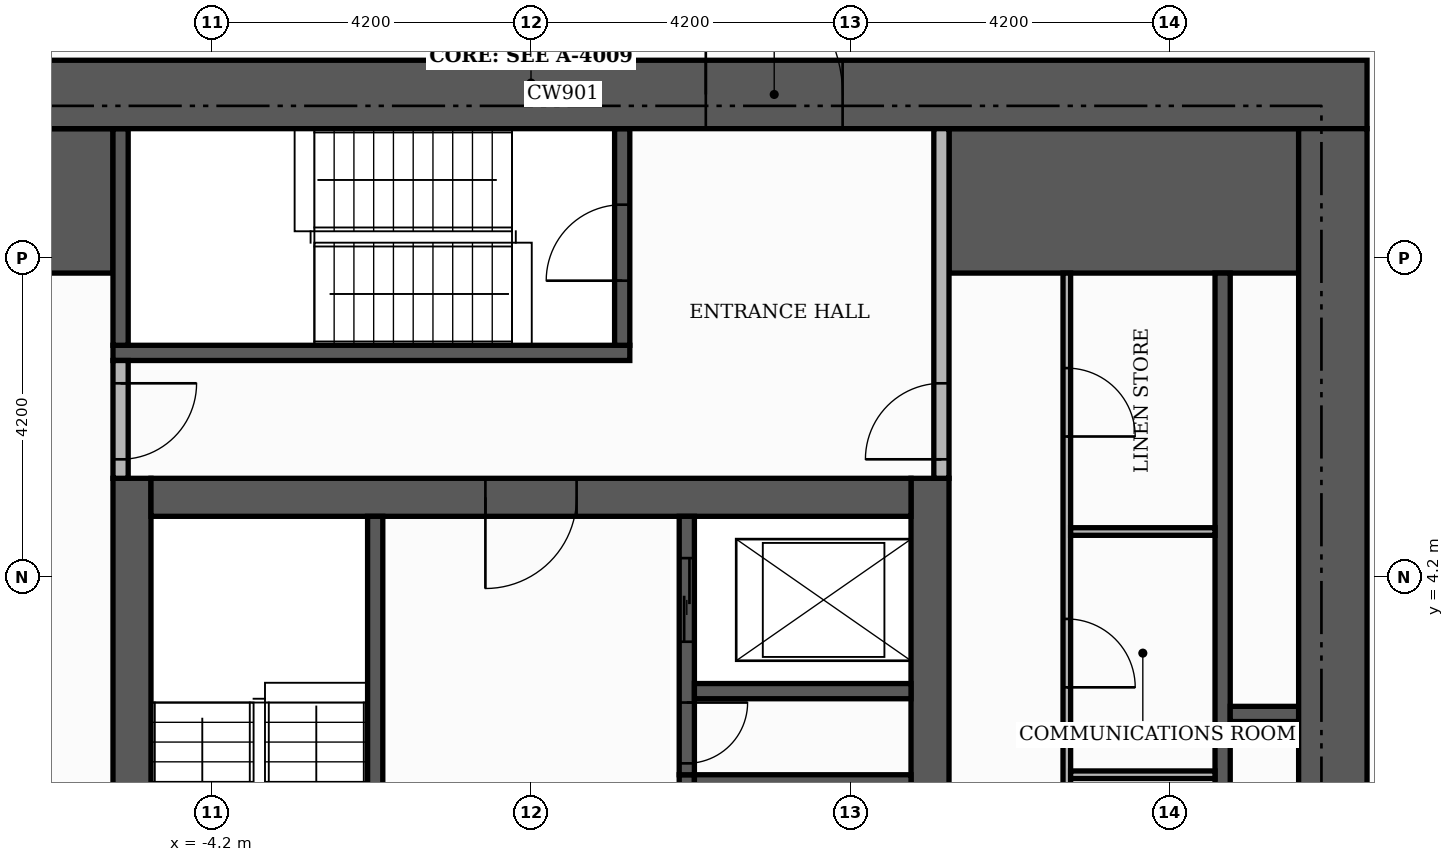
"""IFC4 building model, lengths in metres.
Left out: names, types, materials, properties, quantities, classifications, styles, units other than length and angle.
Written with IfcOpenShell. Run it as: python <this file> out.ifc"""

import sys

from ifc_helpers import new_model, si_unit, direction, frame, frame_2d, origin, place, context, subcontext, project, spatial, rectangle, extrude, element, fill, save


model = new_model("IFC4")
c1 = context("Model", 3, precision=1e-05, world=origin(), true_north=direction((0.0, 1.0)))
c2 = subcontext(c1, "Body", "Model", "MODEL_VIEW")
j1 = project(units=[si_unit("LENGTHUNIT", "METRE"), si_unit("PLANEANGLEUNIT", "RADIAN")], contexts=[c1])
p1 = place(None, origin())
s1 = spatial("IfcSite", under=j1, at=p1, CompositionType="ELEMENT")
p2 = place(p1, origin())
s2 = spatial("IfcBuilding", under=s1, at=p2, CompositionType="ELEMENT")
p3 = place(p2, frame((0.0, 0.0, 42.6)))
s3 = spatial("IfcBuildingStorey", under=s2, at=p3, CompositionType="ELEMENT", Elevation=42.6)
for number, where, z_axis, x_axis in (
    (1, (-5.25, -5.0, 0.0), (0.0, 0.0, 1.0), (0.0, 1.0, 0.0)),
    (2, (5.25, -5.0, 0.0), (0.0, 0.0, 1.0), (0.0, 1.0, 0.0)),
):
    element("IfcWall", number, at=place(p3, frame(where, z_axis=z_axis, x_axis=x_axis)), inside=s3, PredefinedType="SHEAR", context=c2, shape_type="SweptSolid", body=[
        extrude(rectangle(XDim=10.5, YDim=0.5, at=frame_2d((5.25, 0.0))), origin(), (0.0, 0.0, 1.0), 3.48),
    ])
p4 = place(p3, frame((-5.0, 5.25, 0.0), z_axis=(0.0, 0.0, 1.0), x_axis=(1.0, 0.0, 0.0)))
e3 = element("IfcWall", 3, at=p4, inside=s3, PredefinedType="SHEAR", context=c2, shape_type="SweptSolid", body=[
    extrude(rectangle(XDim=10.0, YDim=0.5, at=frame_2d((5.0, 0.0))), origin(), (0.0, 0.0, 1.0), 3.48),
])
p5 = place(p4, frame((4.4, 0.0, 0.0)))
e4 = element("IfcOpeningElement", 4, at=p5, cuts=e3, PredefinedType="OPENING", context=c2, shape_type="SweptSolid", body=[
    extrude(rectangle(XDim=1.2, YDim=2.1, at=frame_2d((0.6, 1.05))), frame((0.0, 0.26, 0.0), z_axis=(0.0, -1.0, 0.0), x_axis=(1.0, 0.0, 0.0)), (0.0, 0.0, 1.0), 0.52),
])
for number, where, z_axis, x_axis in (
    (5, (-10.1, 9.15, 0.0), (0.0, 0.0, 1.0), (1.0, 0.0, 0.0)),
    (6, (5.5, 9.15, 0.0), (0.0, 0.0, 1.0), (1.0, 0.0, 0.0)),
):
    element("IfcWall", number, at=place(p3, frame(where, z_axis=z_axis, x_axis=x_axis)), inside=s3, PredefinedType="SHEAR", context=c2, shape_type="SweptSolid", body=[
        extrude(rectangle(XDim=4.6, YDim=1.9, at=frame_2d((2.3, 0.0))), origin(), (0.0, 0.0, 1.0), 3.48),
    ])
p6 = place(p3, frame((2.05, -5.0, 0.0), z_axis=(0.0, 0.0, 1.0), x_axis=(0.0, 1.0, 0.0)))
e7 = element("IfcWall", 7, at=p6, inside=s3, PredefinedType="SHEAR", context=c2, shape_type="SweptSolid", body=[
    extrude(rectangle(XDim=6.6, YDim=0.2, at=frame_2d((3.3, 0.0))), origin(), (0.0, 0.0, 1.0), 3.48),
])
p7 = place(p6, frame((5.25, 0.0, 0.0)))
e8 = element("IfcOpeningElement", 8, at=p7, cuts=e7, PredefinedType="OPENING", context=c2, shape_type="SweptSolid", body=[
    extrude(rectangle(XDim=1.0, YDim=2.1, at=frame_2d((0.5, 1.05))), frame((0.0, 0.11, 0.0), z_axis=(0.0, -1.0, 0.0), x_axis=(1.0, 0.0, 0.0)), (0.0, 0.0, 1.0), 0.22),
])
p8 = place(p3, frame((-2.05, -1.4, 0.0), z_axis=(0.0, 0.0, 1.0), x_axis=(0.0, 1.0, 0.0)))
e9 = element("IfcWall", 9, at=p8, inside=s3, PredefinedType="SHEAR", context=c2, shape_type="SweptSolid", body=[
    extrude(rectangle(XDim=6.4, YDim=0.2, at=frame_2d((3.2, 0.0))), origin(), (0.0, 0.0, 1.0), 3.48),
])
p9 = place(p8, frame((0.15, 0.0, 0.0)))
e10 = element("IfcOpeningElement", 10, at=p9, cuts=e9, PredefinedType="OPENING", context=c2, shape_type="SweptSolid", body=[
    extrude(rectangle(XDim=1.0, YDim=2.1, at=frame_2d((0.5, 1.05))), frame((0.0, 0.11, 0.0), z_axis=(0.0, -1.0, 0.0), x_axis=(1.0, 0.0, 0.0)), (0.0, 0.0, 1.0), 0.22),
])
p10 = place(p3, frame((2.15, 1.5, 0.0), z_axis=(0.0, 0.0, 1.0), x_axis=(1.0, 0.0, 0.0)))
e11 = element("IfcWall", 11, at=p10, inside=s3, PredefinedType="SHEAR", context=c2, shape_type="SweptSolid", body=[
    extrude(rectangle(XDim=2.85, YDim=0.2, at=frame_2d((1.425, 0.0))), origin(), (0.0, 0.0, 1.0), 3.48),
])
p11 = place(p3, frame((-5.5, 7.15, 0.0), z_axis=(0.0, 0.0, 1.0), x_axis=(1.0, 0.0, 0.0)))
e12 = element("IfcWall", 12, at=p11, inside=s3, PredefinedType="SHEAR", context=c2, shape_type="SweptSolid", body=[
    extrude(rectangle(XDim=6.8, YDim=0.2, at=frame_2d((3.4, 0.0))), origin(), (0.0, 0.0, 1.0), 3.48),
])
p12 = place(p3, frame((-5.4, 7.25, 0.0), z_axis=(0.0, 0.0, 1.0), x_axis=(0.0, 1.0, 0.0)))
e13 = element("IfcWall", 13, at=p12, inside=s3, PredefinedType="SHEAR", context=c2, shape_type="SweptSolid", body=[
    extrude(rectangle(XDim=2.85, YDim=0.2, at=frame_2d((1.425, 0.0))), origin(), (0.0, 0.0, 1.0), 3.48),
])
p13 = place(p3, frame((1.2, 7.25, 0.0), z_axis=(0.0, 0.0, 1.0), x_axis=(0.0, 1.0, 0.0)))
e14 = element("IfcWall", 14, at=p13, inside=s3, PredefinedType="SHEAR", context=c2, shape_type="SweptSolid", body=[
    extrude(rectangle(XDim=2.85, YDim=0.2, at=frame_2d((1.425, 0.0))), origin(), (0.0, 0.0, 1.0), 3.48),
])
p14 = place(p13, frame((0.85, 0.0, 0.0)))
e15 = element("IfcOpeningElement", 15, at=p14, cuts=e14, PredefinedType="OPENING", context=c2, shape_type="SweptSolid", body=[
    extrude(rectangle(XDim=1.0, YDim=2.1, at=frame_2d((0.5, 1.05))), frame((0.0, 0.11, 0.0), z_axis=(0.0, -1.0, 0.0), x_axis=(1.0, 0.0, 0.0)), (0.0, 0.0, 1.0), 0.22),
])
p15 = place(p3, frame((9.1, -8.2, 0.0), z_axis=(0.0, 0.0, 1.0), x_axis=(0.0, 1.0, 0.0)))
e16 = element("IfcWall", 16, at=p15, inside=s3, PredefinedType="SHEAR", context=c2, shape_type="SweptSolid", body=[
    extrude(rectangle(XDim=16.4, YDim=0.2, at=frame_2d((8.2, 0.0))), origin(), (0.0, 0.0, 1.0), 3.48),
])
p16 = place(p3, frame((2.05, 1.6, 0.0), z_axis=(0.0, 0.0, 1.0), x_axis=(0.0, 1.0, 0.0)))
e17 = element("IfcWall", 17, at=p16, inside=s3, PredefinedType="SHEAR", context=c2, shape_type="SweptSolid", body=[
    extrude(rectangle(XDim=3.4, YDim=0.2, at=frame_2d((1.7, 0.0))), origin(), (0.0, 0.0, 1.0), 3.48),
])
p17 = place(p16, frame((1.75, 0.0, 0.0)))
e18 = element("IfcOpeningElement", 18, at=p17, cuts=e17, PredefinedType="OPENING", context=c2, shape_type="SweptSolid", body=[
    extrude(rectangle(XDim=1.1, YDim=2.1, at=frame_2d((0.55, 1.05))), frame((0.0, 0.11, 0.0), z_axis=(0.0, -1.0, 0.0), x_axis=(1.0, 0.0, 0.0)), (0.0, 0.0, 1.0), 0.22),
])
p18 = place(p16, frame((0.15, 0.0, 0.0)))
e19 = element("IfcOpeningElement", 19, at=p18, cuts=e17, PredefinedType="OPENING", context=c2, shape_type="SweptSolid", body=[
    extrude(rectangle(XDim=0.8, YDim=2.1, at=frame_2d((0.4, 1.05))), frame((0.0, 0.11, 0.0), z_axis=(0.0, -1.0, 0.0), x_axis=(1.0, 0.0, 0.0)), (0.0, 0.0, 1.0), 0.22),
])
p19 = place(p3, frame((9.2, 2.4, 0.0), z_axis=(0.0, 0.0, 1.0), x_axis=(1.0, 0.0, 0.0)))
e20 = element("IfcWall", 20, at=p19, inside=s3, PredefinedType="SHEAR", context=c2, shape_type="SweptSolid", body=[
    extrude(rectangle(XDim=0.9, YDim=0.2, at=frame_2d((0.45, 0.0))), origin(), (0.0, 0.0, 1.0), 3.48),
])
p20 = place(p3, frame((2.15, 2.7, 0.0), z_axis=(0.0, 0.0, 1.0), x_axis=(1.0, 0.0, 0.0)))
e21 = element("IfcWall", 21, at=p20, inside=s3, PredefinedType="SHEAR", context=c2, shape_type="SweptSolid", body=[
    extrude(rectangle(XDim=2.85, YDim=0.2, at=frame_2d((1.425, 0.0))), origin(), (0.0, 0.0, 1.0), 3.48),
])
p21 = place(p3, frame((-11.0, 10.55, 0.0), z_axis=(0.0, 0.0, 1.0), x_axis=(1.0, 0.0, 0.0)))
e22 = element("IfcWall", 22, at=p21, inside=s3, PredefinedType="SHEAR", context=c2, shape_type="SweptSolid", body=[
    extrude(rectangle(XDim=22.0, YDim=0.9, at=frame_2d((11.0, 0.0))), origin(), (0.0, 0.0, 1.0), 3.48),
])
p22 = place(p21, frame((13.3, 0.0, 0.0)))
e23 = element("IfcOpeningElement", 23, at=p22, cuts=e22, PredefinedType="OPENING", context=c2, shape_type="SweptSolid", body=[
    extrude(rectangle(XDim=1.8, YDim=2.2, at=frame_2d((0.9, 1.1))), frame((0.0, 0.46, 0.0), z_axis=(0.0, -1.0, 0.0), x_axis=(1.0, 0.0, 0.0)), (0.0, 0.0, 1.0), 0.92),
])
p23 = place(p3, frame((10.55, -10.1, 0.0), z_axis=(0.0, 0.0, 1.0), x_axis=(0.0, 1.0, 0.0)))
e24 = element("IfcWall", 24, at=p23, inside=s3, PredefinedType="SHEAR", context=c2, shape_type="SweptSolid", body=[
    extrude(rectangle(XDim=20.2, YDim=0.9, at=frame_2d((10.1, 0.0))), origin(), (0.0, 0.0, 1.0), 3.48),
])
p24 = place(p3, frame((7.05, -8.2, 0.0), z_axis=(0.0, 0.0, 1.0), x_axis=(0.0, 1.0, 0.0)))
e25 = element("IfcWall", 25, at=p24, inside=s3, PredefinedType="PARTITIONING", context=c2, shape_type="SweptSolid", body=[
    extrude(rectangle(XDim=16.4, YDim=0.1, at=frame_2d((8.2, 0.0))), origin(), (0.0, 0.0, 1.0), 3.48),
])
p25 = place(p24, frame((1.15, 0.0, 0.0)))
e26 = element("IfcOpeningElement", 26, at=p25, cuts=e25, PredefinedType="OPENING", context=c2, shape_type="SweptSolid", body=[
    extrude(rectangle(XDim=0.9, YDim=2.1, at=frame_2d((0.45, 1.05))), frame((0.0, 0.06, 0.0), z_axis=(0.0, -1.0, 0.0), x_axis=(1.0, 0.0, 0.0)), (0.0, 0.0, 1.0), 0.12),
])
p26 = place(p24, frame((4.3, 0.0, 0.0)))
e27 = element("IfcOpeningElement", 27, at=p26, cuts=e25, PredefinedType="OPENING", context=c2, shape_type="SweptSolid", body=[
    extrude(rectangle(XDim=1.0, YDim=2.1, at=frame_2d((0.5, 1.05))), frame((0.0, 0.06, 0.0), z_axis=(0.0, -1.0, 0.0), x_axis=(1.0, 0.0, 0.0)), (0.0, 0.0, 1.0), 0.12),
])
p27 = place(p24, frame((7.65, 0.0, 0.0)))
e28 = element("IfcOpeningElement", 28, at=p27, cuts=e25, PredefinedType="OPENING", context=c2, shape_type="SweptSolid", body=[
    extrude(rectangle(XDim=0.9, YDim=2.1, at=frame_2d((0.45, 1.05))), frame((0.0, 0.06, 0.0), z_axis=(0.0, -1.0, 0.0), x_axis=(1.0, 0.0, 0.0)), (0.0, 0.0, 1.0), 0.12),
])
p28 = place(p24, frame((10.95, 0.0, 0.0)))
e29 = element("IfcOpeningElement", 29, at=p28, cuts=e25, PredefinedType="OPENING", context=c2, shape_type="SweptSolid", body=[
    extrude(rectangle(XDim=0.9, YDim=2.1, at=frame_2d((0.45, 1.05))), frame((0.0, 0.06, 0.0), z_axis=(0.0, -1.0, 0.0), x_axis=(1.0, 0.0, 0.0)), (0.0, 0.0, 1.0), 0.12),
])
p29 = place(p24, frame((14.25, 0.0, 0.0)))
e30 = element("IfcOpeningElement", 30, at=p29, cuts=e25, PredefinedType="OPENING", context=c2, shape_type="SweptSolid", body=[
    extrude(rectangle(XDim=0.9, YDim=2.1, at=frame_2d((0.45, 1.05))), frame((0.0, 0.06, 0.0), z_axis=(0.0, -1.0, 0.0), x_axis=(1.0, 0.0, 0.0)), (0.0, 0.0, 1.0), 0.12),
])
for number, where, z_axis, x_axis in (
    (31, (7.1, 1.6, 0.0), (0.0, 0.0, 1.0), (1.0, 0.0, 0.0)),
    (32, (7.1, 4.8, 0.0), (0.0, 0.0, 1.0), (1.0, 0.0, 0.0)),
):
    element("IfcWall", number, at=place(p3, frame(where, z_axis=z_axis, x_axis=x_axis)), inside=s3, PredefinedType="PARTITIONING", context=c2, shape_type="SweptSolid", body=[
        extrude(rectangle(XDim=1.9, YDim=0.1, at=frame_2d((0.95, 0.0))), origin(), (0.0, 0.0, 1.0), 3.48),
    ])
p30 = place(p3, frame((-5.4, 5.5, 0.0), z_axis=(0.0, 0.0, 1.0), x_axis=(0.0, 1.0, 0.0)))
e33 = element("IfcWall", 33, at=p30, inside=s3, PredefinedType="PARTITIONING", context=c2, shape_type="SweptSolid", body=[
    extrude(rectangle(XDim=1.55, YDim=0.2, at=frame_2d((0.775, 0.0))), origin(), (0.0, 0.0, 1.0), 3.48),
])
p31 = place(p30, frame((0.25, 0.0, 0.0)))
e34 = element("IfcOpeningElement", 34, at=p31, cuts=e33, PredefinedType="OPENING", context=c2, shape_type="SweptSolid", body=[
    extrude(rectangle(XDim=1.0, YDim=2.1, at=frame_2d((0.5, 1.05))), frame((0.0, 0.11, 0.0), z_axis=(0.0, -1.0, 0.0), x_axis=(1.0, 0.0, 0.0)), (0.0, 0.0, 1.0), 0.22),
])
p32 = place(p3, frame((5.4, 5.5, 0.0), z_axis=(0.0, 0.0, 1.0), x_axis=(0.0, 1.0, 0.0)))
e35 = element("IfcWall", 35, at=p32, inside=s3, PredefinedType="PARTITIONING", context=c2, shape_type="SweptSolid", body=[
    extrude(rectangle(XDim=4.6, YDim=0.2, at=frame_2d((2.3, 0.0))), origin(), (0.0, 0.0, 1.0), 3.48),
])
p33 = place(p32, frame((0.25, 0.0, 0.0)))
e36 = element("IfcOpeningElement", 36, at=p33, cuts=e35, PredefinedType="OPENING", context=c2, shape_type="SweptSolid", body=[
    extrude(rectangle(XDim=1.0, YDim=2.1, at=frame_2d((0.5, 1.05))), frame((0.0, 0.11, 0.0), z_axis=(0.0, -1.0, 0.0), x_axis=(1.0, 0.0, 0.0)), (0.0, 0.0, 1.0), 0.22),
])
p34 = place(p17, origin())
e37 = element("IfcDoor", 37, at=p34, inside=s3, OperationType="SLIDING_TO_LEFT", PredefinedType="DOOR", context=c2, shape_type="SweptSolid", body=[
    extrude(rectangle(XDim=1.1, YDim=2.1, at=frame_2d((0.55, 1.05))), frame((0.0, 0.025, 0.0), z_axis=(0.0, -1.0, 0.0), x_axis=(1.0, 0.0, 0.0)), (0.0, 0.0, 1.0), 0.05),
])
fill(e18, e37)
p35 = place(p18, frame((0.8, 0.0, 0.0), z_axis=(0.0, 0.0, 1.0), x_axis=(-1.0, 0.0, 0.0)))
e38 = element("IfcDoor", 38, at=p35, inside=s3, OperationType="SINGLE_SWING_RIGHT", PredefinedType="DOOR", context=c2, shape_type="SweptSolid", body=[
    extrude(rectangle(XDim=0.8, YDim=2.1, at=frame_2d((0.4, 1.05))), frame((0.0, 0.025, 0.0), z_axis=(0.0, -1.0, 0.0), x_axis=(1.0, 0.0, 0.0)), (0.0, 0.0, 1.0), 0.05),
])
fill(e19, e38)
p36 = place(p5, frame((1.2, 0.0, 0.0), z_axis=(0.0, 0.0, 1.0), x_axis=(-1.0, 0.0, 0.0)))
e39 = element("IfcDoor", 39, at=p36, inside=s3, OperationType="SINGLE_SWING_LEFT", PredefinedType="DOOR", context=c2, shape_type="SweptSolid", body=[
    extrude(rectangle(XDim=1.2, YDim=2.1, at=frame_2d((0.6, 1.05))), frame((0.0, 0.025, 0.0), z_axis=(0.0, -1.0, 0.0), x_axis=(1.0, 0.0, 0.0)), (0.0, 0.0, 1.0), 0.05),
])
fill(e4, e39)
p37 = place(p14, origin())
e40 = element("IfcDoor", 40, at=p37, inside=s3, OperationType="SINGLE_SWING_LEFT", PredefinedType="DOOR", context=c2, shape_type="SweptSolid", body=[
    extrude(rectangle(XDim=1.0, YDim=2.1, at=frame_2d((0.5, 1.05))), frame((0.0, 0.025, 0.0), z_axis=(0.0, -1.0, 0.0), x_axis=(1.0, 0.0, 0.0)), (0.0, 0.0, 1.0), 0.05),
])
fill(e15, e40)
p38 = place(p31, frame((1.0, 0.0, 0.0), z_axis=(0.0, 0.0, 1.0), x_axis=(-1.0, 0.0, 0.0)))
e41 = element("IfcDoor", 41, at=p38, inside=s3, OperationType="SINGLE_SWING_RIGHT", PredefinedType="DOOR", context=c2, shape_type="SweptSolid", body=[
    extrude(rectangle(XDim=1.0, YDim=2.1, at=frame_2d((0.5, 1.05))), frame((0.0, 0.025, 0.0), z_axis=(0.0, -1.0, 0.0), x_axis=(1.0, 0.0, 0.0)), (0.0, 0.0, 1.0), 0.05),
])
fill(e34, e41)
p39 = place(p33, origin())
e42 = element("IfcDoor", 42, at=p39, inside=s3, OperationType="SINGLE_SWING_LEFT", PredefinedType="DOOR", context=c2, shape_type="SweptSolid", body=[
    extrude(rectangle(XDim=1.0, YDim=2.1, at=frame_2d((0.5, 1.05))), frame((0.0, 0.025, 0.0), z_axis=(0.0, -1.0, 0.0), x_axis=(1.0, 0.0, 0.0)), (0.0, 0.0, 1.0), 0.05),
])
fill(e36, e42)
p40 = place(p22, origin())
e43 = element("IfcDoor", 43, at=p40, inside=s3, OperationType="DOUBLE_DOOR_SINGLE_SWING", PredefinedType="DOOR", context=c2, shape_type="SweptSolid", body=[
    extrude(rectangle(XDim=1.8, YDim=2.2, at=frame_2d((0.9, 1.1))), frame((0.0, 0.025, 0.0), z_axis=(0.0, -1.0, 0.0), x_axis=(1.0, 0.0, 0.0)), (0.0, 0.0, 1.0), 0.05),
])
fill(e23, e43)
p41 = place(p28, frame((0.9, 0.0, 0.0), z_axis=(0.0, 0.0, 1.0), x_axis=(-1.0, 0.0, 0.0)))
e44 = element("IfcDoor", 44, at=p41, inside=s3, OperationType="SINGLE_SWING_LEFT", PredefinedType="DOOR", context=c2, shape_type="SweptSolid", body=[
    extrude(rectangle(XDim=0.9, YDim=2.1, at=frame_2d((0.45, 1.05))), frame((0.0, 0.025, 0.0), z_axis=(0.0, -1.0, 0.0), x_axis=(1.0, 0.0, 0.0)), (0.0, 0.0, 1.0), 0.05),
])
fill(e29, e44)
p42 = place(p29, frame((0.9, 0.0, 0.0), z_axis=(0.0, 0.0, 1.0), x_axis=(-1.0, 0.0, 0.0)))
e45 = element("IfcDoor", 45, at=p42, inside=s3, OperationType="SINGLE_SWING_LEFT", PredefinedType="DOOR", context=c2, shape_type="SweptSolid", body=[
    extrude(rectangle(XDim=0.9, YDim=2.1, at=frame_2d((0.45, 1.05))), frame((0.0, 0.025, 0.0), z_axis=(0.0, -1.0, 0.0), x_axis=(1.0, 0.0, 0.0)), (0.0, 0.0, 1.0), 0.05),
])
fill(e30, e45)
save(model, sys.argv[1])
